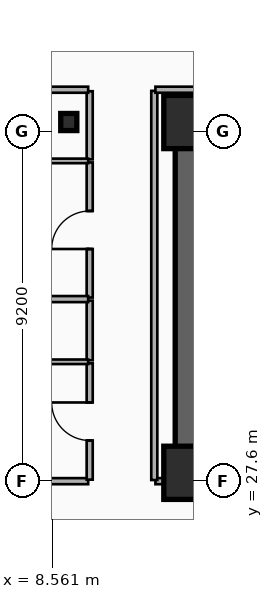
"""IFC4 building model, lengths in metres.
Left out: names, types, materials, properties, quantities, classifications, styles, units other than length and angle.
Written with IfcOpenShell. Run it as: python <this file> out.ifc"""

import sys

from ifc_helpers import new_model, si_unit, direction, frame, frame_2d, origin, origin_2d, place, context, subcontext, project, spatial, rectangle, i_section, extrude, element, fill, save


model = new_model("IFC4")
c1 = context("Model", 3, precision=1e-05, world=origin(), true_north=direction((0.0, 1.0)))
c2 = subcontext(c1, "Body", "Model", "MODEL_VIEW")
j1 = project(units=[si_unit("LENGTHUNIT", "METRE"), si_unit("PLANEANGLEUNIT", "RADIAN")], contexts=[c1])
p1 = place(None, origin())
s1 = spatial("IfcSite", under=j1, at=p1, CompositionType="ELEMENT")
p2 = place(p1, origin())
s2 = spatial("IfcBuilding", under=s1, at=p2, CompositionType="ELEMENT")
p3 = place(p2, frame((0.0, 0.0, 46.5)))
s3 = spatial("IfcBuildingStorey", under=s2, at=p3, CompositionType="ELEMENT", Elevation=46.5)
p4 = place(p3, frame((12.15, 37.05, 0.0), z_axis=(0.0, 0.0, 1.0), x_axis=(1.0, 0.0, 0.0)))
e1 = element("IfcWall", 1, at=p4, inside=s3, PredefinedType="SHEAR", context=c2, shape_type="SweptSolid", body=[
    extrude(rectangle(XDim=33.23, YDim=0.7, at=frame_2d((16.615, 0.0))), origin(), (0.0, 0.0, 1.0), 3.5),
])
p5 = place(p3, frame((21.18, 27.82, 0.0), z_axis=(0.0, 0.0, 1.0), x_axis=(-1.0, 0.0, 0.0)))
e2 = element("IfcWall", 2, at=p5, inside=s3, PredefinedType="SHEAR", context=c2, shape_type="SweptSolid", body=[
    extrude(rectangle(XDim=9.03, YDim=0.7, at=frame_2d((4.515, 0.0))), origin(), (0.0, 0.0, 1.0), 3.5),
])
p6 = place(p5, frame((2.68, 0.0, 0.0)))
e3 = element("IfcOpeningElement", 3, at=p6, cuts=e2, PredefinedType="OPENING", context=c2, shape_type="SweptSolid", body=[
    extrude(rectangle(XDim=1.1, YDim=2.15, at=frame_2d((0.55, 1.075))), frame((0.0, 0.36, 0.0), z_axis=(0.0, -1.0, 0.0), x_axis=(1.0, 0.0, 0.0)), (0.0, 0.0, 1.0), 0.72),
])
p7 = place(p3, frame((12.15, 28.17, 0.0), z_axis=(0.0, 0.0, 1.0), x_axis=(0.0, 1.0, 0.0)))
e4 = element("IfcWall", 4, at=p7, inside=s3, PredefinedType="SHEAR", context=c2, shape_type="SweptSolid", body=[
    extrude(rectangle(XDim=8.53, YDim=0.7, at=frame_2d((4.265, 0.0))), origin(), (0.0, 0.0, 1.0), 3.5),
])
for number, where, z_axis, x_axis in (
    (5, (12.2, 27.82, 0.0), (0.0, 0.0, 1.0), (1.0, 0.0, 0.0)),
    (6, (12.2, 37.05, 0.0), (0.0, 0.0, 1.0), (1.0, 0.0, 0.0)),
):
    element("IfcColumn", number, at=place(p3, frame(where, z_axis=z_axis, x_axis=x_axis)), inside=s3, PredefinedType="COLUMN", context=c2, shape_type="SweptSolid", body=[
        extrude(rectangle(XDim=1.4, YDim=1.4, at=origin_2d()), origin(), (0.0, 0.0, 1.0), 3.5),
    ])
p8 = place(p3, frame((9.0, 37.05, 0.0), z_axis=(0.0, 0.0, 1.0), x_axis=(1.0, 0.0, 0.0)))
e7 = element("IfcColumn", 7, at=p8, inside=s3, PredefinedType="COLUMN", context=c2, shape_type="SweptSolid", body=[
    extrude(i_section(OverallWidth=0.424, OverallDepth=0.45, WebThickness=0.041, FlangeThickness=0.065, FilletRadius=0.015, at=origin_2d()), origin(), (0.0, 0.0, 1.0), 3.5),
])
p9 = place(p3, frame((0.26, 27.6, 0.0), z_axis=(0.0, 0.0, 1.0), x_axis=(1.0, 0.0, 0.0)))
e8 = element("IfcWall", 8, at=p9, inside=s3, PredefinedType="PARTITIONING", context=c2, shape_type="SweptSolid", body=[
    extrude(rectangle(XDim=9.25, YDim=0.16, at=frame_2d((4.625, 0.0))), origin(), (0.0, 0.0, 1.0), 2.57),
])
p10 = place(p9, frame((4.125, 0.0, 0.0)))
e9 = element("IfcOpeningElement", 9, at=p10, cuts=e8, PredefinedType="OPENING", context=c2, shape_type="SweptSolid", body=[
    extrude(rectangle(XDim=1.0, YDim=2.15, at=frame_2d((0.5, 1.075))), frame((0.0, 0.09, 0.0), z_axis=(0.0, -1.0, 0.0), x_axis=(1.0, 0.0, 0.0)), (0.0, 0.0, 1.0), 0.18),
])
p11 = place(p3, frame((9.55, 27.64, 0.0), z_axis=(0.0, 0.0, 1.0), x_axis=(0.0, 1.0, 0.0)))
e10 = element("IfcWall", 10, at=p11, inside=s3, PredefinedType="PARTITIONING", context=c2, shape_type="SweptSolid", body=[
    extrude(rectangle(XDim=3.061, YDim=0.16, at=frame_2d((1.531, 0.0))), origin(), (0.0, 0.0, 1.0), 3.24),
])
p12 = place(p11, frame((1.031, 0.0, 0.0)))
e11 = element("IfcOpeningElement", 11, at=p12, cuts=e10, PredefinedType="OPENING", context=c2, shape_type="SweptSolid", body=[
    extrude(rectangle(XDim=1.0, YDim=2.15, at=frame_2d((0.5, 1.075))), frame((0.0, 0.09, 0.0), z_axis=(0.0, -1.0, 0.0), x_axis=(1.0, 0.0, 0.0)), (0.0, 0.0, 1.0), 0.18),
])
p13 = place(p3, frame((9.55, 30.781, 0.0), z_axis=(0.0, 0.0, 1.0), x_axis=(0.0, 1.0, 0.0)))
e12 = element("IfcWall", 12, at=p13, inside=s3, PredefinedType="PARTITIONING", context=c2, shape_type="SweptSolid", body=[
    extrude(rectangle(XDim=1.57, YDim=0.16, at=frame_2d((0.785, 0.0))), origin(), (0.0, 0.0, 1.0), 3.24),
])
p14 = place(p3, frame((9.55, 32.431, 0.0), z_axis=(0.0, 0.0, 1.0), x_axis=(0.0, 1.0, 0.0)))
e13 = element("IfcWall", 13, at=p14, inside=s3, PredefinedType="PARTITIONING", context=c2, shape_type="SweptSolid", body=[
    extrude(rectangle(XDim=3.556, YDim=0.16, at=frame_2d((1.778, 0.0))), origin(), (0.0, 0.0, 1.0), 3.24),
])
p15 = place(p14, frame((1.278, 0.0, 0.0)))
e14 = element("IfcOpeningElement", 14, at=p15, cuts=e13, PredefinedType="OPENING", context=c2, shape_type="SweptSolid", body=[
    extrude(rectangle(XDim=1.0, YDim=2.15, at=frame_2d((0.5, 1.075))), frame((0.0, 0.09, 0.0), z_axis=(0.0, -1.0, 0.0), x_axis=(1.0, 0.0, 0.0)), (0.0, 0.0, 1.0), 0.18),
])
p16 = place(p3, frame((9.55, 36.067, 0.0), z_axis=(0.0, 0.0, 1.0), x_axis=(0.0, 1.0, 0.0)))
e15 = element("IfcWall", 15, at=p16, inside=s3, PredefinedType="PARTITIONING", context=c2, shape_type="SweptSolid", body=[
    extrude(rectangle(XDim=1.793, YDim=0.16, at=frame_2d((0.896, 0.0))), origin(), (0.0, 0.0, 1.0), 2.72),
])
p17 = place(p3, frame((2.8, 37.9, 0.0), z_axis=(0.0, 0.0, 1.0), x_axis=(1.0, 0.0, 0.0)))
e16 = element("IfcWall", 16, at=p17, inside=s3, PredefinedType="PARTITIONING", context=c2, shape_type="SweptSolid", body=[
    extrude(rectangle(XDim=6.71, YDim=0.16, at=frame_2d((3.355, 0.0))), origin(), (0.0, 0.0, 1.0), 3.24),
])
p18 = place(p3, frame((2.8, 30.741, 0.0), z_axis=(0.0, 0.0, 1.0), x_axis=(1.0, 0.0, 0.0)))
e17 = element("IfcWall", 17, at=p18, inside=s3, PredefinedType="PARTITIONING", context=c2, shape_type="SweptSolid", body=[
    extrude(rectangle(XDim=6.71, YDim=0.12, at=frame_2d((3.355, 0.0))), origin(), (0.0, 0.0, 1.0), 2.57),
])
p19 = place(p18, frame((2.905, 0.0, 0.0)))
e18 = element("IfcOpeningElement", 18, at=p19, cuts=e17, PredefinedType="OPENING", context=c2, shape_type="SweptSolid", body=[
    extrude(rectangle(XDim=0.9, YDim=2.1, at=frame_2d((0.45, 1.05))), frame((0.0, 0.07, 0.0), z_axis=(0.0, -1.0, 0.0), x_axis=(1.0, 0.0, 0.0)), (0.0, 0.0, 1.0), 0.14),
])
p20 = place(p3, frame((2.8, 32.391, 0.0), z_axis=(0.0, 0.0, 1.0), x_axis=(1.0, 0.0, 0.0)))
e19 = element("IfcWall", 19, at=p20, inside=s3, PredefinedType="PARTITIONING", context=c2, shape_type="SweptSolid", body=[
    extrude(rectangle(XDim=6.71, YDim=0.16, at=frame_2d((3.355, 0.0))), origin(), (0.0, 0.0, 1.0), 2.57),
])
p21 = place(p3, frame((2.8, 36.027, 0.0), z_axis=(0.0, 0.0, 1.0), x_axis=(1.0, 0.0, 0.0)))
e20 = element("IfcWall", 20, at=p21, inside=s3, PredefinedType="PARTITIONING", context=c2, shape_type="SweptSolid", body=[
    extrude(rectangle(XDim=6.71, YDim=0.12, at=frame_2d((3.355, 0.0))), origin(), (0.0, 0.0, 1.0), 2.57),
])
p22 = place(p21, frame((2.905, 0.0, 0.0)))
e21 = element("IfcOpeningElement", 21, at=p22, cuts=e20, PredefinedType="OPENING", context=c2, shape_type="SweptSolid", body=[
    extrude(rectangle(XDim=0.9, YDim=2.1, at=frame_2d((0.45, 1.05))), frame((0.0, 0.07, 0.0), z_axis=(0.0, -1.0, 0.0), x_axis=(1.0, 0.0, 0.0)), (0.0, 0.0, 1.0), 0.14),
])
p23 = place(p3, frame((11.28, 27.6, 0.0), z_axis=(0.0, 0.0, 1.0), x_axis=(1.0, 0.0, 0.0)))
e22 = element("IfcWall", 22, at=p23, inside=s3, PredefinedType="PARTITIONING", context=c2, shape_type="SweptSolid", body=[
    extrude(rectangle(XDim=0.84, YDim=0.16, at=frame_2d((0.42, 0.0))), origin(), (0.0, 0.0, 1.0), 2.28),
])
p24 = place(p3, frame((11.25, 27.63, 0.0), z_axis=(0.0, 0.0, 1.0), x_axis=(0.0, 1.0, 0.0)))
e23 = element("IfcWall", 23, at=p24, inside=s3, PredefinedType="PARTITIONING", context=c2, shape_type="SweptSolid", body=[
    extrude(rectangle(XDim=10.24, YDim=0.16, at=frame_2d((5.12, 0.0))), origin(), (0.0, 0.0, 1.0), 2.72),
])
p25 = place(p3, frame((11.28, 37.9, 0.0), z_axis=(0.0, 0.0, 1.0), x_axis=(1.0, 0.0, 0.0)))
e24 = element("IfcWall", 24, at=p25, inside=s3, PredefinedType="PARTITIONING", context=c2, shape_type="SweptSolid", body=[
    extrude(rectangle(XDim=35.04, YDim=0.16, at=frame_2d((17.52, 0.0))), origin(), (0.0, 0.0, 1.0), 3.24),
])
p26 = place(p12, origin())
e25 = element("IfcDoor", 25, at=p26, inside=s3, OperationType="SINGLE_SWING_RIGHT", PredefinedType="DOOR", context=c2, shape_type="SweptSolid", body=[
    extrude(rectangle(XDim=1.0, YDim=2.15, at=frame_2d((0.5, 1.075))), frame((0.0, 0.025, 0.0), z_axis=(0.0, -1.0, 0.0), x_axis=(1.0, 0.0, 0.0)), (0.0, 0.0, 1.0), 0.05),
])
fill(e11, e25)
p27 = place(p15, origin())
e26 = element("IfcDoor", 26, at=p27, inside=s3, OperationType="SINGLE_SWING_LEFT", PredefinedType="DOOR", context=c2, shape_type="SweptSolid", body=[
    extrude(rectangle(XDim=1.0, YDim=2.15, at=frame_2d((0.5, 1.075))), frame((0.0, 0.025, 0.0), z_axis=(0.0, -1.0, 0.0), x_axis=(1.0, 0.0, 0.0)), (0.0, 0.0, 1.0), 0.05),
])
fill(e14, e26)
save(model, sys.argv[1])
